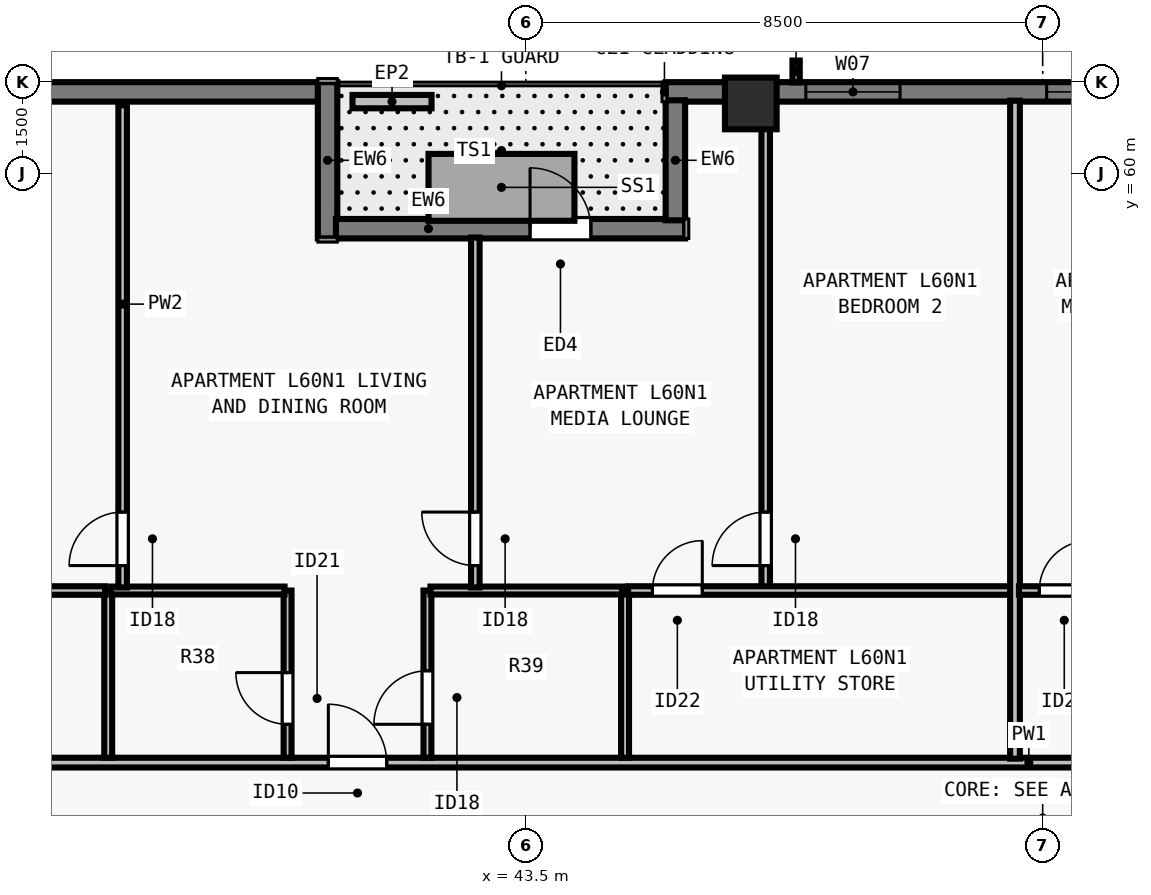
"""IFC4 building model, lengths in metres.
Left out: names, types, materials, properties, quantities, classifications, styles, units other than length and angle.
Written with IfcOpenShell. Run it as: python <this file> out.ifc"""

import sys

from ifc_helpers import new_model, si_unit, direction, frame, frame_2d, origin, origin_2d, place, context, subcontext, project, spatial, rectangle, extrude, element, fill, save


model = new_model("IFC4")
c1 = context("Model", 3, precision=1e-05, world=origin(), true_north=direction((0.0, 1.0)))
c2 = subcontext(c1, "Body", "Model", "MODEL_VIEW")
j1 = project(units=[si_unit("LENGTHUNIT", "METRE"), si_unit("PLANEANGLEUNIT", "RADIAN")], contexts=[c1])
p1 = place(None, origin())
s1 = spatial("IfcSite", under=j1, at=p1, CompositionType="ELEMENT")
p2 = place(p1, origin())
s2 = spatial("IfcBuilding", under=s1, at=p2, CompositionType="ELEMENT")
p3 = place(p2, frame((0.0, 0.0, 220.0)))
s3 = spatial("IfcBuildingStorey", under=s2, at=p3, CompositionType="ELEMENT", Elevation=220.0)
p4 = place(p3, frame((47.2, 61.15, 0.0), z_axis=(0.0, 0.0, 1.0), x_axis=(1.0, 0.0, 0.0)))
e1 = element("IfcColumn", 1, at=p4, inside=s3, PredefinedType="COLUMN", context=c2, shape_type="SweptSolid", body=[
    extrude(rectangle(XDim=0.85, YDim=0.85, at=origin_2d()), origin(), (0.0, 0.0, 1.0), 3.5),
])
p5 = place(p3, frame((45.8, 61.34, 0.0), z_axis=(0.0, 0.0, 1.0), x_axis=(1.0, 0.0, 0.0)))
e2 = element("IfcWall", 2, at=p5, inside=s3, PredefinedType="SOLIDWALL", context=c2, shape_type="SweptSolid", body=[
    extrude(rectangle(XDim=23.402, YDim=0.32, at=frame_2d((11.701, 0.0))), origin(), (0.0, 0.0, 1.0), 3.29),
])
p6 = place(p5, frame((2.305, 0.0, 0.8)))
e3 = element("IfcOpeningElement", 3, at=p6, cuts=e2, PredefinedType="OPENING", context=c2, shape_type="SweptSolid", body=[
    extrude(rectangle(XDim=1.55, YDim=1.678, at=frame_2d((0.775, 0.839))), frame((0.0, 0.17, 0.0), z_axis=(0.0, -1.0, 0.0), x_axis=(1.0, 0.0, 0.0)), (0.0, 0.0, 1.0), 0.34),
])
p7 = place(p5, frame((6.266, 0.0, 0.8)))
e4 = element("IfcOpeningElement", 4, at=p7, cuts=e2, PredefinedType="OPENING", context=c2, shape_type="SweptSolid", body=[
    extrude(rectangle(XDim=1.85, YDim=1.678, at=frame_2d((0.925, 0.839))), frame((0.0, 0.17, 0.0), z_axis=(0.0, -1.0, 0.0), x_axis=(1.0, 0.0, 0.0)), (0.0, 0.0, 1.0), 0.34),
])
p8 = place(p5, frame((13.136, 0.0, 0.8)))
e5 = element("IfcOpeningElement", 5, at=p8, cuts=e2, PredefinedType="OPENING", context=c2, shape_type="SweptSolid", body=[
    extrude(rectangle(XDim=1.85, YDim=1.678, at=frame_2d((0.925, 0.839))), frame((0.0, 0.17, 0.0), z_axis=(0.0, -1.0, 0.0), x_axis=(1.0, 0.0, 0.0)), (0.0, 0.0, 1.0), 0.34),
])
p9 = place(p5, frame((16.497, 0.0, 0.8)))
e6 = element("IfcOpeningElement", 6, at=p9, cuts=e2, PredefinedType="OPENING", context=c2, shape_type="SweptSolid", body=[
    extrude(rectangle(XDim=1.55, YDim=1.678, at=frame_2d((0.775, 0.839))), frame((0.0, 0.17, 0.0), z_axis=(0.0, -1.0, 0.0), x_axis=(1.0, 0.0, 0.0)), (0.0, 0.0, 1.0), 0.34),
])
p10 = place(p3, frame((34.5, 61.34, 0.0), z_axis=(0.0, 0.0, 1.0), x_axis=(1.0, 0.0, 0.0)))
e7 = element("IfcWall", 7, at=p10, inside=s3, PredefinedType="SOLIDWALL", context=c2, shape_type="SweptSolid", body=[
    extrude(rectangle(XDim=5.602, YDim=0.32, at=frame_2d((2.801, 0.0))), origin(), (0.0, 0.0, 1.0), 3.29),
])
p11 = place(p3, frame((40.24, 61.5, 0.0), z_axis=(0.0, 0.0, 1.0), x_axis=(0.0, -1.0, 0.0)))
e8 = element("IfcWall", 8, at=p11, inside=s3, PredefinedType="SOLIDWALL", context=c2, shape_type="SweptSolid", body=[
    extrude(rectangle(XDim=2.57, YDim=0.32, at=frame_2d((1.285, 0.0))), origin(), (0.0, 0.0, 1.0), 3.29),
])
p12 = place(p3, frame((40.378, 59.09, 0.0), z_axis=(0.0, 0.0, 1.0), x_axis=(1.0, 0.0, 0.0)))
e9 = element("IfcWall", 9, at=p12, inside=s3, PredefinedType="SOLIDWALL", context=c2, shape_type="SweptSolid", body=[
    extrude(rectangle(XDim=5.742, YDim=0.32, at=frame_2d((2.871, 0.0))), origin(), (0.0, 0.0, 1.0), 3.29),
])
p13 = place(p12, frame((3.192, 0.0, 0.0)))
e10 = element("IfcOpeningElement", 10, at=p13, cuts=e9, PredefinedType="OPENING", context=c2, shape_type="SweptSolid", body=[
    extrude(rectangle(XDim=1.0, YDim=2.15, at=frame_2d((0.5, 1.075))), frame((0.0, 0.17, 0.0), z_axis=(0.0, -1.0, 0.0), x_axis=(1.0, 0.0, 0.0)), (0.0, 0.0, 1.0), 0.34),
])
p14 = place(p3, frame((45.96, 59.228, 0.0), z_axis=(0.0, 0.0, 1.0), x_axis=(0.0, 1.0, 0.0)))
e11 = element("IfcWall", 11, at=p14, inside=s3, PredefinedType="SOLIDWALL", context=c2, shape_type="SweptSolid", body=[
    extrude(rectangle(XDim=1.974, YDim=0.32, at=frame_2d((0.987, 0.0))), origin(), (0.0, 0.0, 1.0), 3.29),
])
p15 = place(p3, frame((40.65, 61.18, 0.0), z_axis=(0.0, 0.0, 1.0), x_axis=(1.0, 0.0, 0.0)))
e12 = element("IfcWall", 12, at=p15, inside=s3, PredefinedType="PARAPET", context=c2, shape_type="SweptSolid", body=[
    extrude(rectangle(XDim=1.3, YDim=0.22, at=frame_2d((0.65, 0.0))), origin(), (0.0, 0.0, 1.0), 0.55),
])
p16 = place(p3, frame((29.805, 50.31, 0.0), z_axis=(0.0, 0.0, 1.0), x_axis=(1.0, 0.0, 0.0)))
e13 = element("IfcWall", 13, at=p16, inside=s3, PredefinedType="PARTITIONING", context=c2, shape_type="SweptSolid", body=[
    extrude(rectangle(XDim=44.39, YDim=0.16, at=frame_2d((22.195, 0.0))), origin(), (0.0, 0.0, 1.0), 2.958),
])
p17 = place(p16, frame((10.448, 0.0, 0.0)))
e14 = element("IfcOpeningElement", 14, at=p17, cuts=e13, PredefinedType="OPENING", context=c2, shape_type="SweptSolid", body=[
    extrude(rectangle(XDim=0.96, YDim=2.18, at=frame_2d((0.48, 1.09))), frame((0.0, 0.09, 0.0), z_axis=(0.0, -1.0, 0.0), x_axis=(1.0, 0.0, 0.0)), (0.0, 0.0, 1.0), 0.18),
])
p18 = place(p16, frame((32.528, 0.0, 0.0)))
e15 = element("IfcOpeningElement", 15, at=p18, cuts=e13, PredefinedType="OPENING", context=c2, shape_type="SweptSolid", body=[
    extrude(rectangle(XDim=0.96, YDim=2.18, at=frame_2d((0.48, 1.09))), frame((0.0, 0.09, 0.0), z_axis=(0.0, -1.0, 0.0), x_axis=(1.0, 0.0, 0.0)), (0.0, 0.0, 1.0), 0.18),
])
p19 = place(p3, frame((36.633, 50.39, 0.0), z_axis=(0.0, 0.0, 1.0), x_axis=(0.0, 1.0, 0.0)))
e16 = element("IfcWall", 16, at=p19, inside=s3, PredefinedType="PLUMBINGWALL", context=c2, shape_type="SweptSolid", body=[
    extrude(rectangle(XDim=2.75, YDim=0.13, at=frame_2d((1.375, 0.0))), origin(), (0.0, 0.0, 1.0), 3.29),
])
p20 = place(p3, frame((39.583, 50.39, 0.0), z_axis=(0.0, 0.0, 1.0), x_axis=(0.0, 1.0, 0.0)))
e17 = element("IfcWall", 17, at=p20, inside=s3, PredefinedType="PLUMBINGWALL", context=c2, shape_type="SweptSolid", body=[
    extrude(rectangle(XDim=2.75, YDim=0.13, at=frame_2d((1.375, 0.0))), origin(), (0.0, 0.0, 1.0), 3.29),
])
p21 = place(p20, frame((0.55, 0.0, 0.0)))
e18 = element("IfcOpeningElement", 18, at=p21, cuts=e17, PredefinedType="OPENING", context=c2, shape_type="SweptSolid", body=[
    extrude(rectangle(XDim=0.85, YDim=2.08, at=frame_2d((0.425, 1.04))), frame((0.0, 0.075, 0.0), z_axis=(0.0, -1.0, 0.0), x_axis=(1.0, 0.0, 0.0)), (0.0, 0.0, 1.0), 0.15),
])
p22 = place(p3, frame((36.683, 53.14, 0.0), z_axis=(0.0, 0.0, 1.0), x_axis=(1.0, 0.0, 0.0)))
e19 = element("IfcWall", 19, at=p22, inside=s3, PredefinedType="PLUMBINGWALL", context=c2, shape_type="SweptSolid", body=[
    extrude(rectangle(XDim=2.85, YDim=0.13, at=frame_2d((1.425, 0.0))), origin(), (0.0, 0.0, 1.0), 3.29),
])
p23 = place(p3, frame((45.133, 50.39, 0.0), z_axis=(0.0, 0.0, 1.0), x_axis=(0.0, 1.0, 0.0)))
e20 = element("IfcWall", 20, at=p23, inside=s3, PredefinedType="PLUMBINGWALL", context=c2, shape_type="SweptSolid", body=[
    extrude(rectangle(XDim=2.75, YDim=0.13, at=frame_2d((1.375, 0.0))), origin(), (0.0, 0.0, 1.0), 3.29),
])
p24 = place(p3, frame((41.883, 50.39, 0.0), z_axis=(0.0, 0.0, 1.0), x_axis=(0.0, 1.0, 0.0)))
e21 = element("IfcWall", 21, at=p24, inside=s3, PredefinedType="PLUMBINGWALL", context=c2, shape_type="SweptSolid", body=[
    extrude(rectangle(XDim=2.75, YDim=0.13, at=frame_2d((1.375, 0.0))), origin(), (0.0, 0.0, 1.0), 3.29),
])
p25 = place(p24, frame((0.55, 0.0, 0.0)))
e22 = element("IfcOpeningElement", 22, at=p25, cuts=e21, PredefinedType="OPENING", context=c2, shape_type="SweptSolid", body=[
    extrude(rectangle(XDim=0.88, YDim=2.1, at=frame_2d((0.44, 1.05))), frame((0.0, 0.075, 0.0), z_axis=(0.0, -1.0, 0.0), x_axis=(1.0, 0.0, 0.0)), (0.0, 0.0, 1.0), 0.15),
])
p26 = place(p3, frame((41.933, 53.14, 0.0), z_axis=(0.0, 0.0, 1.0), x_axis=(1.0, 0.0, 0.0)))
e23 = element("IfcWall", 23, at=p26, inside=s3, PredefinedType="PLUMBINGWALL", context=c2, shape_type="SweptSolid", body=[
    extrude(rectangle(XDim=3.15, YDim=0.13, at=frame_2d((1.575, 0.0))), origin(), (0.0, 0.0, 1.0), 3.29),
])
p27 = place(p3, frame((36.87, 53.19, 0.0), z_axis=(0.0, 0.0, 1.0), x_axis=(0.0, 1.0, 0.0)))
e24 = element("IfcWall", 24, at=p27, inside=s3, PredefinedType="PARTITIONING", context=c2, shape_type="SweptSolid", body=[
    extrude(rectangle(XDim=7.93, YDim=0.14, at=frame_2d((3.965, 0.0))), origin(), (0.0, 0.0, 1.0), 2.573),
])
p28 = place(p27, frame((0.36, 0.0, 0.0)))
e25 = element("IfcOpeningElement", 25, at=p28, cuts=e24, PredefinedType="OPENING", context=c2, shape_type="SweptSolid", body=[
    extrude(rectangle(XDim=0.88, YDim=2.1, at=frame_2d((0.44, 1.05))), frame((0.0, 0.08, 0.0), z_axis=(0.0, -1.0, 0.0), x_axis=(1.0, 0.0, 0.0)), (0.0, 0.0, 1.0), 0.16),
])
p29 = place(p3, frame((29.87, 53.14, 0.0), z_axis=(0.0, 0.0, 1.0), x_axis=(1.0, 0.0, 0.0)))
e26 = element("IfcWall", 26, at=p29, inside=s3, PredefinedType="PARTITIONING", context=c2, shape_type="SweptSolid", body=[
    extrude(rectangle(XDim=6.712, YDim=0.14, at=frame_2d((3.356, 0.0))), origin(), (0.0, 0.0, 1.0), 2.958),
])
p30 = place(p29, frame((0.45, 0.0, 0.0)))
e27 = element("IfcOpeningElement", 27, at=p30, cuts=e26, PredefinedType="OPENING", context=c2, shape_type="SweptSolid", body=[
    extrude(rectangle(XDim=0.82, YDim=2.1, at=frame_2d((0.41, 1.05))), frame((0.0, 0.08, 0.0), z_axis=(0.0, -1.0, 0.0), x_axis=(1.0, 0.0, 0.0)), (0.0, 0.0, 1.0), 0.16),
])
p31 = place(p3, frame((47.445, 53.1, 0.0), z_axis=(0.0, 0.0, 1.0), x_axis=(0.0, 1.0, 0.0)))
e28 = element("IfcWall", 28, at=p31, inside=s3, PredefinedType="PARTITIONING", context=c2, shape_type="SweptSolid", body=[
    extrude(rectangle(XDim=8.02, YDim=0.14, at=frame_2d((4.01, 0.0))), origin(), (0.0, 0.0, 1.0), 3.29),
])
p32 = place(p31, frame((0.45, 0.0, 0.0)))
e29 = element("IfcOpeningElement", 29, at=p32, cuts=e28, PredefinedType="OPENING", context=c2, shape_type="SweptSolid", body=[
    extrude(rectangle(XDim=0.88, YDim=2.1, at=frame_2d((0.44, 1.05))), frame((0.0, 0.08, 0.0), z_axis=(0.0, -1.0, 0.0), x_axis=(1.0, 0.0, 0.0)), (0.0, 0.0, 1.0), 0.16),
])
p33 = place(p3, frame((45.183, 53.14, 0.0), z_axis=(0.0, 0.0, 1.0), x_axis=(1.0, 0.0, 0.0)))
e30 = element("IfcWall", 30, at=p33, inside=s3, PredefinedType="PARTITIONING", context=c2, shape_type="SweptSolid", body=[
    extrude(rectangle(XDim=6.412, YDim=0.14, at=frame_2d((3.206, 0.0))), origin(), (0.0, 0.0, 1.0), 3.29),
])
p34 = place(p33, frame((0.4, 0.0, 0.0)))
e31 = element("IfcOpeningElement", 31, at=p34, cuts=e30, PredefinedType="OPENING", context=c2, shape_type="SweptSolid", body=[
    extrude(rectangle(XDim=0.82, YDim=2.1, at=frame_2d((0.41, 1.05))), frame((0.0, 0.08, 0.0), z_axis=(0.0, -1.0, 0.0), x_axis=(1.0, 0.0, 0.0)), (0.0, 0.0, 1.0), 0.16),
])
p35 = place(p3, frame((42.67, 53.19, 0.0), z_axis=(0.0, 0.0, 1.0), x_axis=(0.0, 1.0, 0.0)))
e32 = element("IfcWall", 32, at=p35, inside=s3, PredefinedType="PARTITIONING", context=c2, shape_type="SweptSolid", body=[
    extrude(rectangle(XDim=5.755, YDim=0.14, at=frame_2d((2.877, 0.0))), origin(), (0.0, 0.0, 1.0), 3.29),
])
p36 = place(p35, frame((0.36, 0.0, 0.0)))
e33 = element("IfcOpeningElement", 33, at=p36, cuts=e32, PredefinedType="OPENING", context=c2, shape_type="SweptSolid", body=[
    extrude(rectangle(XDim=0.88, YDim=2.1, at=frame_2d((0.44, 1.05))), frame((0.0, 0.08, 0.0), z_axis=(0.0, -1.0, 0.0), x_axis=(1.0, 0.0, 0.0)), (0.0, 0.0, 1.0), 0.16),
])
p37 = place(p3, frame((51.545, 50.375, 0.0), z_axis=(0.0, 0.0, 1.0), x_axis=(0.0, 1.0, 0.0)))
e34 = element("IfcWall", 34, at=p37, inside=s3, PredefinedType="PARTITIONING", context=c2, shape_type="SweptSolid", body=[
    extrude(rectangle(XDim=10.82, YDim=0.16, at=frame_2d((5.41, 0.0))), origin(), (0.0, 0.0, 1.0), 2.958),
])
p38 = place(p3, frame((51.61, 53.14, 0.0), z_axis=(0.0, 0.0, 1.0), x_axis=(1.0, 0.0, 0.0)))
e35 = element("IfcWall", 35, at=p38, inside=s3, PredefinedType="PARTITIONING", context=c2, shape_type="SweptSolid", body=[
    extrude(rectangle(XDim=7.052, YDim=0.14, at=frame_2d((3.526, 0.0))), origin(), (0.0, 0.0, 1.0), 3.29),
])
p39 = place(p38, frame((0.335, 0.0, 0.0)))
e36 = element("IfcOpeningElement", 36, at=p39, cuts=e35, PredefinedType="OPENING", context=c2, shape_type="SweptSolid", body=[
    extrude(rectangle(XDim=0.82, YDim=2.1, at=frame_2d((0.41, 1.05))), frame((0.0, 0.08, 0.0), z_axis=(0.0, -1.0, 0.0), x_axis=(1.0, 0.0, 0.0)), (0.0, 0.0, 1.0), 0.16),
])
p40 = place(p6, origin())
e37 = element("IfcWindow", 37, at=p40, inside=s3, PartitioningType="SINGLE_PANEL", PredefinedType="WINDOW", context=c2, shape_type="SweptSolid", body=[
    extrude(rectangle(XDim=1.55, YDim=1.678, at=frame_2d((0.775, 0.839))), frame((0.0, -0.05, 0.0), z_axis=(0.0, -1.0, 0.0), x_axis=(1.0, 0.0, 0.0)), (0.0, 0.0, 1.0), 0.06),
])
fill(e3, e37)
p41 = place(p7, origin())
e38 = element("IfcWindow", 38, at=p41, inside=s3, PartitioningType="SINGLE_PANEL", PredefinedType="WINDOW", context=c2, shape_type="SweptSolid", body=[
    extrude(rectangle(XDim=1.85, YDim=1.678, at=frame_2d((0.925, 0.839))), frame((0.0, -0.05, 0.0), z_axis=(0.0, -1.0, 0.0), x_axis=(1.0, 0.0, 0.0)), (0.0, 0.0, 1.0), 0.06),
])
fill(e4, e38)
p42 = place(p13, origin())
e39 = element("IfcDoor", 39, at=p42, inside=s3, OperationType="SINGLE_SWING_LEFT", PredefinedType="DOOR", context=c2, shape_type="SweptSolid", body=[
    extrude(rectangle(XDim=1.0, YDim=2.15, at=frame_2d((0.5, 1.075))), frame((0.0, 0.025, 0.0), z_axis=(0.0, -1.0, 0.0), x_axis=(1.0, 0.0, 0.0)), (0.0, 0.0, 1.0), 0.05),
])
fill(e10, e39)
p43 = place(p21, origin())
e40 = element("IfcDoor", 40, at=p43, inside=s3, OperationType="SINGLE_SWING_RIGHT", PredefinedType="DOOR", context=c2, shape_type="SweptSolid", body=[
    extrude(rectangle(XDim=0.85, YDim=2.08, at=frame_2d((0.425, 1.04))), frame((0.0, 0.025, 0.0), z_axis=(0.0, -1.0, 0.0), x_axis=(1.0, 0.0, 0.0)), (0.0, 0.0, 1.0), 0.05),
])
fill(e18, e40)
p44 = place(p25, origin())
e41 = element("IfcDoor", 41, at=p44, inside=s3, OperationType="SINGLE_SWING_LEFT", PredefinedType="DOOR", context=c2, shape_type="SweptSolid", body=[
    extrude(rectangle(XDim=0.88, YDim=2.1, at=frame_2d((0.44, 1.05))), frame((0.0, 0.025, 0.0), z_axis=(0.0, -1.0, 0.0), x_axis=(1.0, 0.0, 0.0)), (0.0, 0.0, 1.0), 0.05),
])
fill(e22, e41)
p45 = place(p28, origin())
e42 = element("IfcDoor", 42, at=p45, inside=s3, OperationType="SINGLE_SWING_LEFT", PredefinedType="DOOR", context=c2, shape_type="SweptSolid", body=[
    extrude(rectangle(XDim=0.88, YDim=2.1, at=frame_2d((0.44, 1.05))), frame((0.0, 0.025, 0.0), z_axis=(0.0, -1.0, 0.0), x_axis=(1.0, 0.0, 0.0)), (0.0, 0.0, 1.0), 0.05),
])
fill(e25, e42)
p46 = place(p34, origin())
e43 = element("IfcDoor", 43, at=p46, inside=s3, OperationType="SINGLE_SWING_RIGHT", PredefinedType="DOOR", context=c2, shape_type="SweptSolid", body=[
    extrude(rectangle(XDim=0.82, YDim=2.1, at=frame_2d((0.41, 1.05))), frame((0.0, 0.025, 0.0), z_axis=(0.0, -1.0, 0.0), x_axis=(1.0, 0.0, 0.0)), (0.0, 0.0, 1.0), 0.05),
])
fill(e31, e43)
p47 = place(p32, origin())
e44 = element("IfcDoor", 44, at=p47, inside=s3, OperationType="SINGLE_SWING_LEFT", PredefinedType="DOOR", context=c2, shape_type="SweptSolid", body=[
    extrude(rectangle(XDim=0.88, YDim=2.1, at=frame_2d((0.44, 1.05))), frame((0.0, 0.025, 0.0), z_axis=(0.0, -1.0, 0.0), x_axis=(1.0, 0.0, 0.0)), (0.0, 0.0, 1.0), 0.05),
])
fill(e29, e44)
p48 = place(p36, origin())
e45 = element("IfcDoor", 45, at=p48, inside=s3, OperationType="SINGLE_SWING_RIGHT", PredefinedType="DOOR", context=c2, shape_type="SweptSolid", body=[
    extrude(rectangle(XDim=0.88, YDim=2.1, at=frame_2d((0.44, 1.05))), frame((0.0, 0.025, 0.0), z_axis=(0.0, -1.0, 0.0), x_axis=(1.0, 0.0, 0.0)), (0.0, 0.0, 1.0), 0.05),
])
fill(e33, e45)
p49 = place(p17, origin())
e46 = element("IfcDoor", 46, at=p49, inside=s3, OperationType="SINGLE_SWING_LEFT", PredefinedType="DOOR", context=c2, shape_type="SweptSolid", body=[
    extrude(rectangle(XDim=0.96, YDim=2.18, at=frame_2d((0.48, 1.09))), frame((0.0, 0.025, 0.0), z_axis=(0.0, -1.0, 0.0), x_axis=(1.0, 0.0, 0.0)), (0.0, 0.0, 1.0), 0.05),
])
fill(e14, e46)
p50 = place(p39, origin())
e47 = element("IfcDoor", 47, at=p50, inside=s3, OperationType="SINGLE_SWING_RIGHT", PredefinedType="DOOR", context=c2, shape_type="SweptSolid", body=[
    extrude(rectangle(XDim=0.82, YDim=2.1, at=frame_2d((0.41, 1.05))), frame((0.0, 0.025, 0.0), z_axis=(0.0, -1.0, 0.0), x_axis=(1.0, 0.0, 0.0)), (0.0, 0.0, 1.0), 0.05),
])
fill(e36, e47)
save(model, sys.argv[1])
